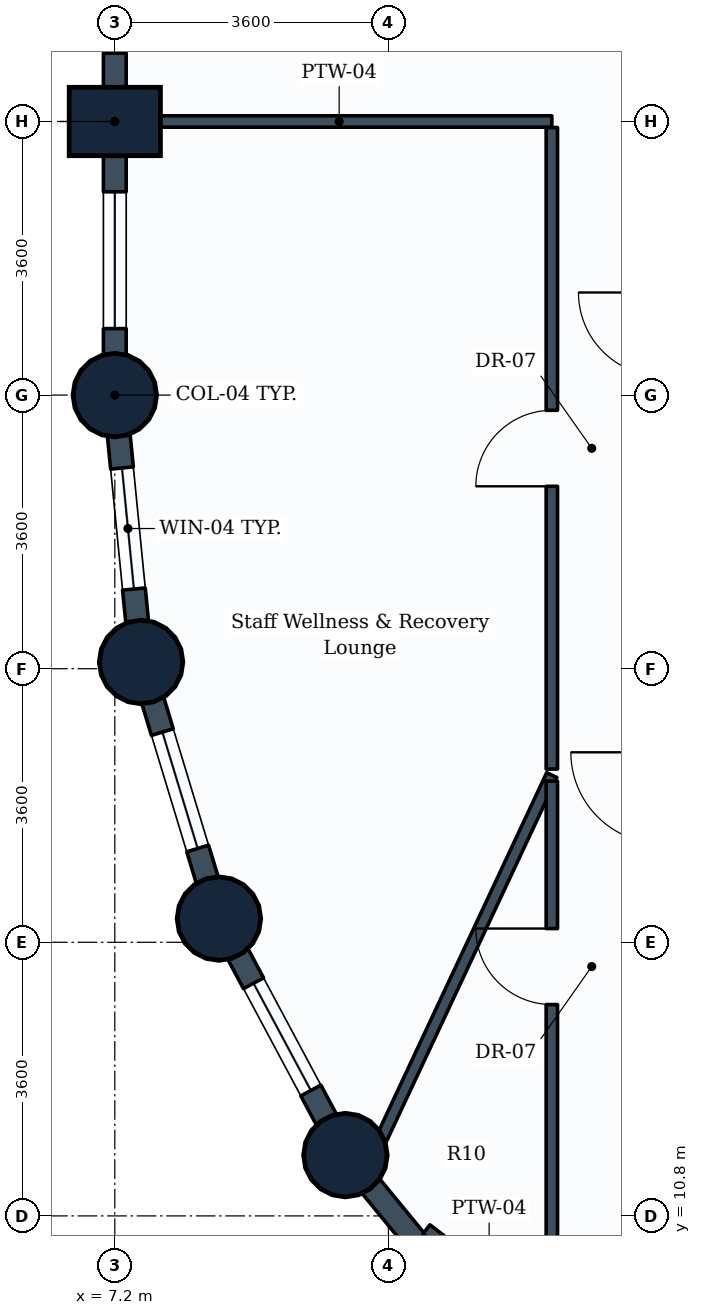
"""IFC4 building model, lengths in metres.
Left out: names, types, materials, properties, quantities, classifications, styles, units other than length and angle.
Written with IfcOpenShell. Run it as: python <this file> out.ifc"""

import sys

from ifc_helpers import new_model, si_unit, direction, frame, frame_2d, origin, origin_2d, place, context, subcontext, project, spatial, rectangle, circle, extrude, element, fill, save


model = new_model("IFC4")
c1 = context("Model", 3, precision=1e-05, world=origin(), true_north=direction((0.0, 1.0)))
c2 = subcontext(c1, "Body", "Model", "MODEL_VIEW")
j1 = project(units=[si_unit("LENGTHUNIT", "METRE"), si_unit("PLANEANGLEUNIT", "RADIAN")], contexts=[c1])
p1 = place(None, origin())
s1 = spatial("IfcSite", under=j1, at=p1, CompositionType="ELEMENT")
p2 = place(p1, origin())
s2 = spatial("IfcBuilding", under=s1, at=p2, CompositionType="ELEMENT")
p3 = place(p2, frame((0.0, 0.0, 47.4)))
s3 = spatial("IfcBuildingStorey", under=s2, at=p3, CompositionType="ELEMENT", Elevation=47.4)
p4 = place(p3, frame((7.2, 21.6, 0.0), z_axis=(0.0, 0.0, 1.0), x_axis=(1.0, 0.0, 0.0)))
e1 = element("IfcColumn", 1, at=p4, inside=s3, PredefinedType="COLUMN", context=c2, shape_type="SweptSolid", body=[
    extrude(circle(Radius=0.55, at=origin_2d()), origin(), (0.0, 0.0, 1.0), 3.9),
])
p5 = place(p3, frame((7.2, 25.2, 0.0), z_axis=(0.0, 0.0, 1.0), x_axis=(0.0, 1.0, 0.0)))
e2 = element("IfcColumn", 2, at=p5, inside=s3, PredefinedType="COLUMN", context=c2, shape_type="SweptSolid", body=[
    extrude(rectangle(XDim=0.9, YDim=1.2, at=origin_2d()), origin(), (0.0, 0.0, 1.0), 3.9),
])
for number, where, z_axis, x_axis in (
    (3, (7.546, 18.088, 0.0), (0.0, 0.0, 1.0), (1.0, 0.0, 0.0)),
    (4, (8.57, 14.712, 0.0), (0.0, 0.0, 1.0), (1.0, 0.0, 0.0)),
    (5, (10.234, 11.6, 0.0), (0.0, 0.0, 1.0), (1.0, 0.0, 0.0)),
):
    element("IfcColumn", number, at=place(p3, frame(where, z_axis=z_axis, x_axis=x_axis)), inside=s3, PredefinedType="COLUMN", context=c2, shape_type="SweptSolid", body=[
        extrude(circle(Radius=0.55, at=origin_2d()), origin(), (0.0, 0.0, 1.0), 3.9),
    ])
p6 = place(p3, frame((7.2, 25.2, 0.0), z_axis=(0.0, 0.0, 1.0), x_axis=(0.0, 1.0, 0.0)))
e6 = element("IfcWall", 6, at=p6, inside=s3, PredefinedType="STANDARD", context=c2, shape_type="SweptSolid", body=[
    extrude(rectangle(XDim=3.6, YDim=0.3, at=frame_2d((1.8, 0.0))), origin(), (0.0, 0.0, 1.0), 2.93),
])
p7 = place(p6, frame((0.9, 0.0, 0.85)))
e7 = element("IfcOpeningElement", 7, at=p7, cuts=e6, PredefinedType="OPENING", context=c2, shape_type="SweptSolid", body=[
    extrude(rectangle(XDim=1.8, YDim=1.35, at=frame_2d((0.9, 0.675))), frame((0.0, 0.16, 0.0), z_axis=(0.0, -1.0, 0.0), x_axis=(1.0, 0.0, 0.0)), (0.0, 0.0, 1.0), 0.32),
])
p8 = place(p3, frame((7.2, 21.6, 0.0), z_axis=(0.0, 0.0, 1.0), x_axis=(0.0, 1.0, 0.0)))
e8 = element("IfcWall", 8, at=p8, inside=s3, PredefinedType="STANDARD", context=c2, shape_type="SweptSolid", body=[
    extrude(rectangle(XDim=3.6, YDim=0.3, at=frame_2d((1.8, 0.0))), origin(), (0.0, 0.0, 1.0), 2.93),
])
p9 = place(p8, frame((0.875, 0.0, 0.85)))
e9 = element("IfcOpeningElement", 9, at=p9, cuts=e8, PredefinedType="OPENING", context=c2, shape_type="SweptSolid", body=[
    extrude(rectangle(XDim=1.8, YDim=1.35, at=frame_2d((0.9, 0.675))), frame((0.0, 0.16, 0.0), z_axis=(0.0, -1.0, 0.0), x_axis=(1.0, 0.0, 0.0)), (0.0, 0.0, 1.0), 0.32),
])
p10 = place(p3, frame((7.546, 18.088, 0.0), z_axis=(0.0, 0.0, 1.0), x_axis=(-0.09802417461, 0.995184033831, 0.0)))
e10 = element("IfcWall", 10, at=p10, inside=s3, PredefinedType="STANDARD", context=c2, shape_type="SweptSolid", body=[
    extrude(rectangle(XDim=3.529, YDim=0.3, at=frame_2d((1.765, 0.0))), origin(), (0.0, 0.0, 1.0), 2.93),
])
p11 = place(p10, frame((0.965, 0.0, 0.85)))
e11 = element("IfcOpeningElement", 11, at=p11, cuts=e10, PredefinedType="OPENING", context=c2, shape_type="SweptSolid", body=[
    extrude(rectangle(XDim=1.6, YDim=1.35, at=frame_2d((0.8, 0.675))), frame((0.0, 0.16, 0.0), z_axis=(0.0, -1.0, 0.0), x_axis=(1.0, 0.0, 0.0)), (0.0, 0.0, 1.0), 0.32),
])
p12 = place(p3, frame((8.57, 14.712, 0.0), z_axis=(0.0, 0.0, 1.0), x_axis=(-0.290305086481, 0.956934144423, 0.0)))
e12 = element("IfcWall", 12, at=p12, inside=s3, PredefinedType="STANDARD", context=c2, shape_type="SweptSolid", body=[
    extrude(rectangle(XDim=3.528, YDim=0.3, at=frame_2d((1.764, 0.0))), origin(), (0.0, 0.0, 1.0), 2.93),
])
p13 = place(p12, frame((0.964, 0.0, 0.85)))
e13 = element("IfcOpeningElement", 13, at=p13, cuts=e12, PredefinedType="OPENING", context=c2, shape_type="SweptSolid", body=[
    extrude(rectangle(XDim=1.6, YDim=1.35, at=frame_2d((0.8, 0.675))), frame((0.0, 0.16, 0.0), z_axis=(0.0, -1.0, 0.0), x_axis=(1.0, 0.0, 0.0)), (0.0, 0.0, 1.0), 0.32),
])
p14 = place(p3, frame((10.234, 11.6, 0.0), z_axis=(0.0, 0.0, 1.0), x_axis=(-0.47151087309, 0.881860247748, 0.0)))
e14 = element("IfcWall", 14, at=p14, inside=s3, PredefinedType="STANDARD", context=c2, shape_type="SweptSolid", body=[
    extrude(rectangle(XDim=3.529, YDim=0.3, at=frame_2d((1.764, 0.0))), origin(), (0.0, 0.0, 1.0), 2.93),
])
p15 = place(p14, frame((0.964, 0.0, 0.85)))
e15 = element("IfcOpeningElement", 15, at=p15, cuts=e14, PredefinedType="OPENING", context=c2, shape_type="SweptSolid", body=[
    extrude(rectangle(XDim=1.6, YDim=1.35, at=frame_2d((0.8, 0.675))), frame((0.0, 0.16, 0.0), z_axis=(0.0, -1.0, 0.0), x_axis=(1.0, 0.0, 0.0)), (0.0, 0.0, 1.0), 0.32),
])
p16 = place(p3, frame((12.472, 8.872, 0.0), z_axis=(0.0, 0.0, 1.0), x_axis=(-0.634258295121, 0.773121216285, 0.0)))
e16 = element("IfcWall", 16, at=p16, inside=s3, PredefinedType="STANDARD", context=c2, shape_type="SweptSolid", body=[
    extrude(rectangle(XDim=3.529, YDim=0.3, at=frame_2d((1.764, 0.0))), origin(), (0.0, 0.0, 1.0), 2.93),
])
p17 = place(p3, frame((7.354, 25.2, 0.0), z_axis=(0.0, 0.0, 1.0), x_axis=(1.0, 0.0, 0.0)))
e17 = element("IfcWall", 17, at=p17, inside=s3, PredefinedType="PARTITIONING", context=c2, shape_type="SweptSolid", body=[
    extrude(rectangle(XDim=5.596, YDim=0.15, at=frame_2d((2.798, 0.0))), origin(), (0.0, 0.0, 1.0), 3.635),
])
p18 = place(p3, frame((12.95, 9.35, 0.0), z_axis=(0.0, 0.0, 1.0), x_axis=(-0.791573423038, 0.611074067474, 0.0)))
e18 = element("IfcWall", 18, at=p18, inside=s3, PredefinedType="PARTITIONING", context=c2, shape_type="SweptSolid", body=[
    extrude(rectangle(XDim=2.084, YDim=0.15, at=frame_2d((1.042, 0.0))), origin(), (0.0, 0.0, 1.0), 2.93),
])
p19 = place(p3, frame((12.95, 16.6, 0.0), z_axis=(0.0, 0.0, 1.0), x_axis=(-0.424335060038, -0.905505249473, 0.0)))
e19 = element("IfcWall", 19, at=p19, inside=s3, PredefinedType="PARTITIONING", context=c2, shape_type="SweptSolid", body=[
    extrude(rectangle(XDim=5.76, YDim=0.15, at=frame_2d((2.88, 0.0))), origin(), (0.0, 0.0, 1.0), 2.93),
])
p20 = place(p3, frame((12.95, 16.679, 0.0), z_axis=(0.0, 0.0, 1.0), x_axis=(0.0, 1.0, 0.0)))
e20 = element("IfcWall", 20, at=p20, inside=s3, PredefinedType="PARTITIONING", context=c2, shape_type="SweptSolid", body=[
    extrude(rectangle(XDim=8.442, YDim=0.15, at=frame_2d((4.221, 0.0))), origin(), (0.0, 0.0, 1.0), 3.08),
])
p21 = place(p20, frame((3.721, 0.0, 0.0)))
e21 = element("IfcOpeningElement", 21, at=p21, cuts=e20, PredefinedType="OPENING", context=c2, shape_type="SweptSolid", body=[
    extrude(rectangle(XDim=1.0, YDim=2.1, at=frame_2d((0.5, 1.05))), frame((0.0, 0.085, 0.0), z_axis=(0.0, -1.0, 0.0), x_axis=(1.0, 0.0, 0.0)), (0.0, 0.0, 1.0), 0.17),
])
p22 = place(p3, frame((12.95, 8.634, 0.0), z_axis=(0.0, 0.0, 1.0), x_axis=(0.0, 1.0, 0.0)))
e22 = element("IfcWall", 22, at=p22, inside=s3, PredefinedType="PARTITIONING", context=c2, shape_type="SweptSolid", body=[
    extrude(rectangle(XDim=7.887, YDim=0.15, at=frame_2d((3.944, 0.0))), origin(), (0.0, 0.0, 1.0), 2.93),
])
p23 = place(p22, frame((4.947, 0.0, 0.0)))
e23 = element("IfcOpeningElement", 23, at=p23, cuts=e22, PredefinedType="OPENING", context=c2, shape_type="SweptSolid", body=[
    extrude(rectangle(XDim=1.0, YDim=2.1, at=frame_2d((0.5, 1.05))), frame((0.0, 0.085, 0.0), z_axis=(0.0, -1.0, 0.0), x_axis=(1.0, 0.0, 0.0)), (0.0, 0.0, 1.0), 0.17),
])
p24 = place(p7, origin())
e24 = element("IfcWindow", 24, at=p24, inside=s3, PartitioningType="SINGLE_PANEL", PredefinedType="WINDOW", context=c2, shape_type="SweptSolid", body=[
    extrude(rectangle(XDim=1.8, YDim=1.35, at=frame_2d((0.9, 0.675))), frame((0.0, 0.03, 0.0), z_axis=(0.0, -1.0, 0.0), x_axis=(1.0, 0.0, 0.0)), (0.0, 0.0, 1.0), 0.06),
])
fill(e7, e24)
p25 = place(p9, origin())
e25 = element("IfcWindow", 25, at=p25, inside=s3, PartitioningType="SINGLE_PANEL", PredefinedType="WINDOW", context=c2, shape_type="SweptSolid", body=[
    extrude(rectangle(XDim=1.8, YDim=1.35, at=frame_2d((0.9, 0.675))), frame((0.0, 0.03, 0.0), z_axis=(0.0, -1.0, 0.0), x_axis=(1.0, 0.0, 0.0)), (0.0, 0.0, 1.0), 0.06),
])
fill(e9, e25)
p26 = place(p11, origin())
e26 = element("IfcWindow", 26, at=p26, inside=s3, PartitioningType="SINGLE_PANEL", PredefinedType="WINDOW", context=c2, shape_type="SweptSolid", body=[
    extrude(rectangle(XDim=1.6, YDim=1.35, at=frame_2d((0.8, 0.675))), frame((0.0, 0.03, 0.0), z_axis=(0.0, -1.0, 0.0), x_axis=(1.0, 0.0, 0.0)), (0.0, 0.0, 1.0), 0.06),
])
fill(e11, e26)
p27 = place(p13, origin())
e27 = element("IfcWindow", 27, at=p27, inside=s3, PartitioningType="SINGLE_PANEL", PredefinedType="WINDOW", context=c2, shape_type="SweptSolid", body=[
    extrude(rectangle(XDim=1.6, YDim=1.35, at=frame_2d((0.8, 0.675))), frame((0.0, 0.03, 0.0), z_axis=(0.0, -1.0, 0.0), x_axis=(1.0, 0.0, 0.0)), (0.0, 0.0, 1.0), 0.06),
])
fill(e13, e27)
p28 = place(p15, origin())
e28 = element("IfcWindow", 28, at=p28, inside=s3, PartitioningType="SINGLE_PANEL", PredefinedType="WINDOW", context=c2, shape_type="SweptSolid", body=[
    extrude(rectangle(XDim=1.6, YDim=1.35, at=frame_2d((0.8, 0.675))), frame((0.0, 0.03, 0.0), z_axis=(0.0, -1.0, 0.0), x_axis=(1.0, 0.0, 0.0)), (0.0, 0.0, 1.0), 0.06),
])
fill(e15, e28)
p29 = place(p21, origin())
e29 = element("IfcDoor", 29, at=p29, inside=s3, OperationType="SINGLE_SWING_LEFT", PredefinedType="DOOR", context=c2, shape_type="SweptSolid", body=[
    extrude(rectangle(XDim=1.0, YDim=2.1, at=frame_2d((0.5, 1.05))), frame((0.0, 0.025, 0.0), z_axis=(0.0, -1.0, 0.0), x_axis=(1.0, 0.0, 0.0)), (0.0, 0.0, 1.0), 0.05),
])
fill(e21, e29)
p30 = place(p23, origin())
e30 = element("IfcDoor", 30, at=p30, inside=s3, OperationType="SINGLE_SWING_RIGHT", PredefinedType="DOOR", context=c2, shape_type="SweptSolid", body=[
    extrude(rectangle(XDim=1.0, YDim=2.1, at=frame_2d((0.5, 1.05))), frame((0.0, 0.025, 0.0), z_axis=(0.0, -1.0, 0.0), x_axis=(1.0, 0.0, 0.0)), (0.0, 0.0, 1.0), 0.05),
])
fill(e23, e30)
save(model, sys.argv[1])
